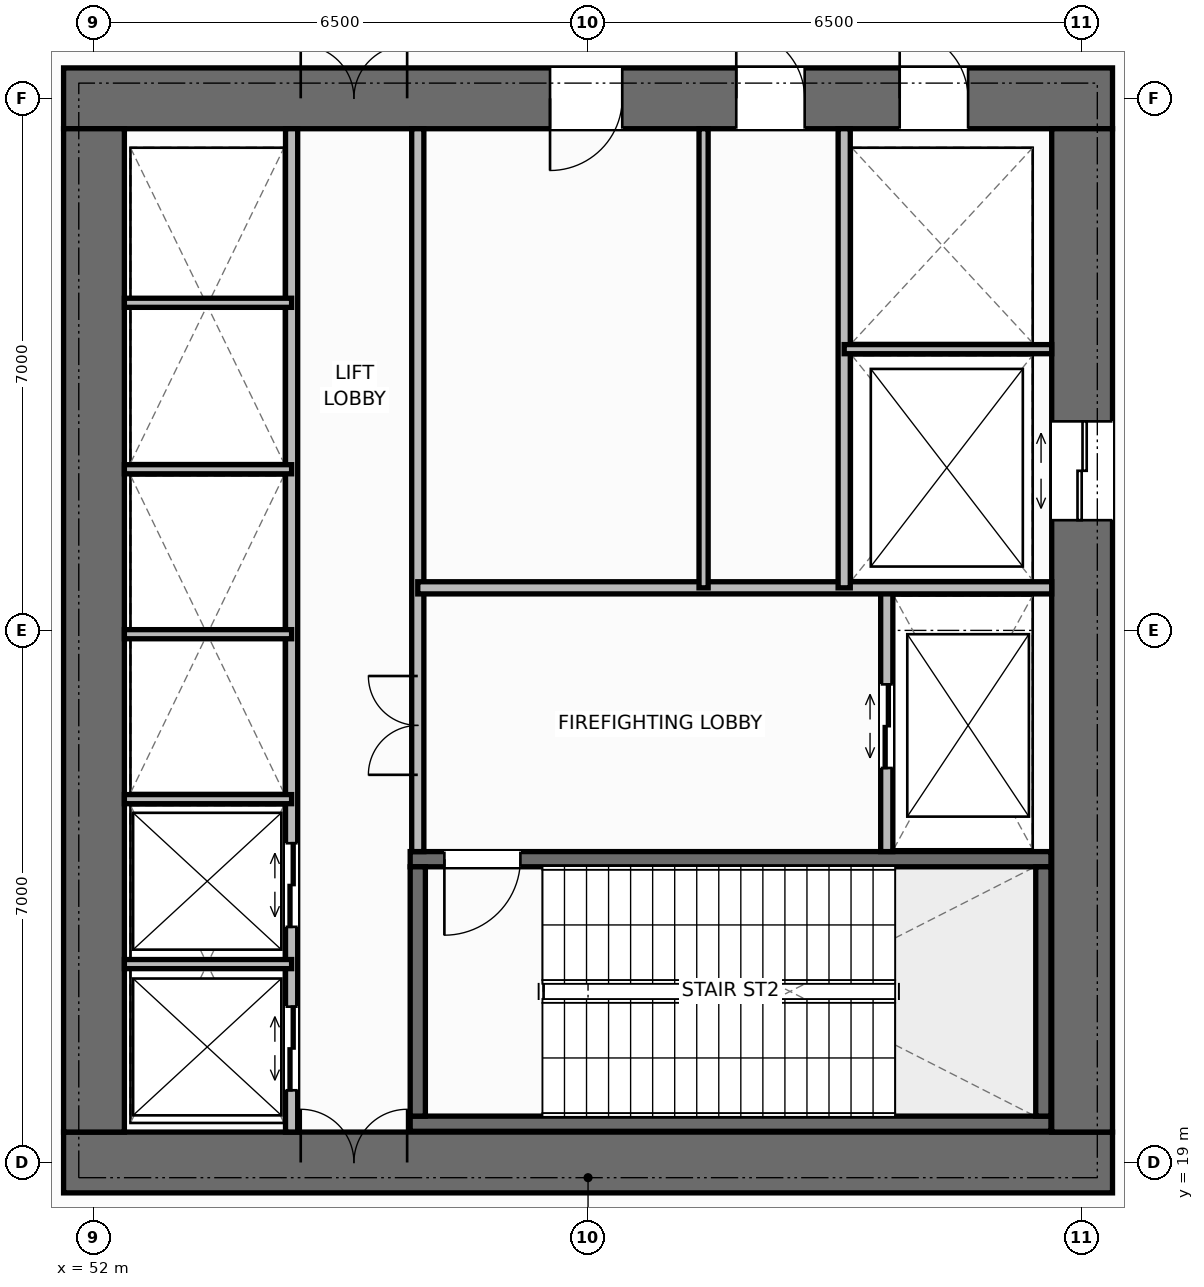
"""IFC4 building model, lengths in metres.
Left out: names, types, materials, properties, quantities, classifications, styles, units other than length and angle.
Written with IfcOpenShell. Run it as: python <this file> out.ifc"""

import sys

from ifc_helpers import new_model, si_unit, direction, frame, frame_2d, origin, place, context, subcontext, project, spatial, rectangle, extrude, element, fill, save


model = new_model("IFC4")
c1 = context("Model", 3, precision=1e-05, world=origin(), true_north=direction((0.0, 1.0)))
c2 = subcontext(c1, "Body", "Model", "MODEL_VIEW")
j1 = project(units=[si_unit("LENGTHUNIT", "METRE"), si_unit("PLANEANGLEUNIT", "RADIAN")], contexts=[c1])
p1 = place(None, origin())
s1 = spatial("IfcSite", under=j1, at=p1, CompositionType="ELEMENT")
p2 = place(p1, origin())
s2 = spatial("IfcBuilding", under=s1, at=p2, CompositionType="ELEMENT")
p3 = place(p2, frame((0.0, 0.0, 22.0)))
s3 = spatial("IfcBuildingStorey", under=s2, at=p3, CompositionType="ELEMENT", Elevation=22.0)
p4 = place(p3, frame((51.6, 19.0, 0.0), z_axis=(0.0, 0.0, 1.0), x_axis=(1.0, 0.0, 0.0)))
e1 = element("IfcWall", 1, at=p4, inside=s3, PredefinedType="SHEAR", context=c2, shape_type="SweptSolid", body=[
    extrude(rectangle(XDim=13.8, YDim=0.8, at=frame_2d((6.9, 0.0))), origin(), (0.0, 0.0, 1.0), 5.8),
])
p5 = place(p4, frame((3.12, 0.0, 0.0)))
e2 = element("IfcOpeningElement", 2, at=p5, cuts=e1, PredefinedType="OPENING", context=c2, shape_type="SweptSolid", body=[
    extrude(rectangle(XDim=1.4, YDim=2.2, at=frame_2d((0.7, 1.1))), frame((0.0, 0.41, 0.0), z_axis=(0.0, -1.0, 0.0), x_axis=(1.0, 0.0, 0.0)), (0.0, 0.0, 1.0), 0.82),
])
p6 = place(p3, frame((51.6, 33.0, 0.0), z_axis=(0.0, 0.0, 1.0), x_axis=(1.0, 0.0, 0.0)))
e3 = element("IfcWall", 3, at=p6, inside=s3, PredefinedType="SHEAR", context=c2, shape_type="SweptSolid", body=[
    extrude(rectangle(XDim=13.8, YDim=0.8, at=frame_2d((6.9, 0.0))), origin(), (0.0, 0.0, 1.0), 5.8),
])
p7 = place(p6, frame((3.12, 0.0, 0.0)))
e4 = element("IfcOpeningElement", 4, at=p7, cuts=e3, PredefinedType="OPENING", context=c2, shape_type="SweptSolid", body=[
    extrude(rectangle(XDim=1.4, YDim=2.2, at=frame_2d((0.7, 1.1))), frame((0.0, 0.41, 0.0), z_axis=(0.0, -1.0, 0.0), x_axis=(1.0, 0.0, 0.0)), (0.0, 0.0, 1.0), 0.82),
])
p8 = place(p6, frame((11.0, 0.0, 0.0)))
e5 = element("IfcOpeningElement", 5, at=p8, cuts=e3, PredefinedType="OPENING", context=c2, shape_type="SweptSolid", body=[
    extrude(rectangle(XDim=0.9, YDim=2.15, at=frame_2d((0.45, 1.075))), frame((0.0, 0.41, 0.0), z_axis=(0.0, -1.0, 0.0), x_axis=(1.0, 0.0, 0.0)), (0.0, 0.0, 1.0), 0.82),
])
p9 = place(p6, frame((6.4, 0.0, 0.0)))
e6 = element("IfcOpeningElement", 6, at=p9, cuts=e3, PredefinedType="OPENING", context=c2, shape_type="SweptSolid", body=[
    extrude(rectangle(XDim=0.95, YDim=2.15, at=frame_2d((0.475, 1.075))), frame((0.0, 0.41, 0.0), z_axis=(0.0, -1.0, 0.0), x_axis=(1.0, 0.0, 0.0)), (0.0, 0.0, 1.0), 0.82),
])
p10 = place(p6, frame((8.85, 0.0, 0.0)))
e7 = element("IfcOpeningElement", 7, at=p10, cuts=e3, PredefinedType="OPENING", context=c2, shape_type="SweptSolid", body=[
    extrude(rectangle(XDim=0.9, YDim=2.15, at=frame_2d((0.45, 1.075))), frame((0.0, 0.41, 0.0), z_axis=(0.0, -1.0, 0.0), x_axis=(1.0, 0.0, 0.0)), (0.0, 0.0, 1.0), 0.82),
])
p11 = place(p3, frame((52.0, 19.4, 0.0), z_axis=(0.0, 0.0, 1.0), x_axis=(0.0, 1.0, 0.0)))
e8 = element("IfcWall", 8, at=p11, inside=s3, PredefinedType="SHEAR", context=c2, shape_type="SweptSolid", body=[
    extrude(rectangle(XDim=13.2, YDim=0.8, at=frame_2d((6.6, 0.0))), origin(), (0.0, 0.0, 1.0), 5.8),
])
p12 = place(p3, frame((65.0, 19.4, 0.0), z_axis=(0.0, 0.0, 1.0), x_axis=(0.0, 1.0, 0.0)))
e9 = element("IfcWall", 9, at=p12, inside=s3, PredefinedType="SHEAR", context=c2, shape_type="SweptSolid", body=[
    extrude(rectangle(XDim=13.2, YDim=0.8, at=frame_2d((6.6, 0.0))), origin(), (0.0, 0.0, 1.0), 5.8),
])
p13 = place(p12, frame((8.05, 0.0, 0.0)))
e10 = element("IfcOpeningElement", 10, at=p13, cuts=e9, PredefinedType="OPENING", context=c2, shape_type="SweptSolid", body=[
    extrude(rectangle(XDim=1.3, YDim=2.2, at=frame_2d((0.65, 1.1))), frame((0.0, 0.41, 0.0), z_axis=(0.0, -1.0, 0.0), x_axis=(1.0, 0.0, 0.0)), (0.0, 0.0, 1.0), 0.82),
])
p14 = place(p3, frame((56.16, 19.51, 0.0), z_axis=(0.0, 0.0, 1.0), x_axis=(1.0, 0.0, 0.0)))
e11 = element("IfcWall", 11, at=p14, inside=s3, PredefinedType="SHEAR", context=c2, shape_type="SweptSolid", body=[
    extrude(rectangle(XDim=8.43, YDim=0.2, at=frame_2d((4.215, 0.0))), origin(), (0.0, 0.0, 1.0), 5.8),
])
p15 = place(p3, frame((56.16, 22.99, 0.0), z_axis=(0.0, 0.0, 1.0), x_axis=(1.0, 0.0, 0.0)))
e12 = element("IfcWall", 12, at=p15, inside=s3, PredefinedType="SHEAR", context=c2, shape_type="SweptSolid", body=[
    extrude(rectangle(XDim=8.43, YDim=0.2, at=frame_2d((4.215, 0.0))), origin(), (0.0, 0.0, 1.0), 5.8),
])
p16 = place(p15, frame((0.45, 0.0, 0.0)))
e13 = element("IfcOpeningElement", 13, at=p16, cuts=e12, PredefinedType="OPENING", context=c2, shape_type="SweptSolid", body=[
    extrude(rectangle(XDim=1.0, YDim=2.15, at=frame_2d((0.5, 1.075))), frame((0.0, 0.11, 0.0), z_axis=(0.0, -1.0, 0.0), x_axis=(1.0, 0.0, 0.0)), (0.0, 0.0, 1.0), 0.22),
])
for number, where, z_axis, x_axis in (
    (14, (56.26, 19.61, 0.0), (0.0, 0.0, 1.0), (0.0, 1.0, 0.0)),
    (15, (64.49, 19.61, 0.0), (0.0, 0.0, 1.0), (0.0, 1.0, 0.0)),
):
    element("IfcWall", number, at=place(p3, frame(where, z_axis=z_axis, x_axis=x_axis)), inside=s3, PredefinedType="SHEAR", context=c2, shape_type="SweptSolid", body=[
        extrude(rectangle(XDim=3.28, YDim=0.2, at=frame_2d((1.64, 0.0))), origin(), (0.0, 0.0, 1.0), 5.8),
    ])
p17 = place(p3, frame((54.6, 19.4, 0.0), z_axis=(0.0, 0.0, 1.0), x_axis=(0.0, 1.0, 0.0)))
e16 = element("IfcWall", 16, at=p17, inside=s3, PredefinedType="STANDARD", context=c2, shape_type="SweptSolid", body=[
    extrude(rectangle(XDim=13.2, YDim=0.16, at=frame_2d((6.6, 0.0))), origin(), (0.0, 0.0, 1.0), 5.55),
])
p18 = place(p17, frame((0.55, 0.0, 0.0)))
e17 = element("IfcOpeningElement", 17, at=p18, cuts=e16, PredefinedType="OPENING", context=c2, shape_type="SweptSolid", body=[
    extrude(rectangle(XDim=1.1, YDim=2.2, at=frame_2d((0.55, 1.1))), frame((0.0, 0.09, 0.0), z_axis=(0.0, -1.0, 0.0), x_axis=(1.0, 0.0, 0.0)), (0.0, 0.0, 1.0), 0.18),
])
p19 = place(p17, frame((2.7, 0.0, 0.0)))
e18 = element("IfcOpeningElement", 18, at=p19, cuts=e16, PredefinedType="OPENING", context=c2, shape_type="SweptSolid", body=[
    extrude(rectangle(XDim=1.1, YDim=2.2, at=frame_2d((0.55, 1.1))), frame((0.0, 0.09, 0.0), z_axis=(0.0, -1.0, 0.0), x_axis=(1.0, 0.0, 0.0)), (0.0, 0.0, 1.0), 0.18),
])
p20 = place(p3, frame((56.26, 23.09, 0.0), z_axis=(0.0, 0.0, 1.0), x_axis=(0.0, 1.0, 0.0)))
e19 = element("IfcWall", 19, at=p20, inside=s3, PredefinedType="STANDARD", context=c2, shape_type="SweptSolid", body=[
    extrude(rectangle(XDim=9.51, YDim=0.16, at=frame_2d((4.755, 0.0))), origin(), (0.0, 0.0, 1.0), 5.55),
])
p21 = place(p20, frame((1.01, 0.0, 0.0)))
e20 = element("IfcOpeningElement", 20, at=p21, cuts=e19, PredefinedType="OPENING", context=c2, shape_type="SweptSolid", body=[
    extrude(rectangle(XDim=1.3, YDim=2.2, at=frame_2d((0.65, 1.1))), frame((0.0, 0.09, 0.0), z_axis=(0.0, -1.0, 0.0), x_axis=(1.0, 0.0, 0.0)), (0.0, 0.0, 1.0), 0.18),
])
for number, where, z_axis, x_axis in (
    (21, (52.4, 21.61, 0.0), (0.0, 0.0, 1.0), (1.0, 0.0, 0.0)),
    (22, (52.4, 23.78, 0.0), (0.0, 0.0, 1.0), (1.0, 0.0, 0.0)),
    (23, (52.4, 25.95, 0.0), (0.0, 0.0, 1.0), (1.0, 0.0, 0.0)),
    (24, (52.4, 28.12, 0.0), (0.0, 0.0, 1.0), (1.0, 0.0, 0.0)),
    (25, (52.4, 30.31, 0.0), (0.0, 0.0, 1.0), (1.0, 0.0, 0.0)),
):
    element("IfcWall", number, at=place(p3, frame(where, z_axis=z_axis, x_axis=x_axis)), inside=s3, PredefinedType="PARTITIONING", context=c2, shape_type="SweptSolid", body=[
        extrude(rectangle(XDim=2.2, YDim=0.12, at=frame_2d((1.1, 0.0))), origin(), (0.0, 0.0, 1.0), 5.55),
    ])
p22 = place(p3, frame((62.43, 23.09, 0.0), z_axis=(0.0, 0.0, 1.0), x_axis=(0.0, 1.0, 0.0)))
e26 = element("IfcWall", 26, at=p22, inside=s3, PredefinedType="STANDARD", context=c2, shape_type="SweptSolid", body=[
    extrude(rectangle(XDim=3.47, YDim=0.16, at=frame_2d((1.735, 0.0))), origin(), (0.0, 0.0, 1.0), 5.55),
])
p23 = place(p22, frame((1.1, 0.0, 0.0)))
e27 = element("IfcOpeningElement", 27, at=p23, cuts=e26, PredefinedType="OPENING", context=c2, shape_type="SweptSolid", body=[
    extrude(rectangle(XDim=1.1, YDim=2.2, at=frame_2d((0.55, 1.1))), frame((0.0, 0.09, 0.0), z_axis=(0.0, -1.0, 0.0), x_axis=(1.0, 0.0, 0.0)), (0.0, 0.0, 1.0), 0.18),
])
p24 = place(p3, frame((56.26, 26.56, 0.0), z_axis=(0.0, 0.0, 1.0), x_axis=(1.0, 0.0, 0.0)))
e28 = element("IfcWall", 28, at=p24, inside=s3, PredefinedType="STANDARD", context=c2, shape_type="SweptSolid", body=[
    extrude(rectangle(XDim=8.34, YDim=0.16, at=frame_2d((4.17, 0.0))), origin(), (0.0, 0.0, 1.0), 5.55),
])
p25 = place(p3, frame((61.87, 26.56, 0.0), z_axis=(0.0, 0.0, 1.0), x_axis=(0.0, 1.0, 0.0)))
e29 = element("IfcWall", 29, at=p25, inside=s3, PredefinedType="STANDARD", context=c2, shape_type="SweptSolid", body=[
    extrude(rectangle(XDim=6.04, YDim=0.16, at=frame_2d((3.02, 0.0))), origin(), (0.0, 0.0, 1.0), 5.55),
])
p26 = place(p3, frame((61.87, 29.7, 0.0), z_axis=(0.0, 0.0, 1.0), x_axis=(1.0, 0.0, 0.0)))
e30 = element("IfcWall", 30, at=p26, inside=s3, PredefinedType="PARTITIONING", context=c2, shape_type="SweptSolid", body=[
    extrude(rectangle(XDim=2.73, YDim=0.12, at=frame_2d((1.365, 0.0))), origin(), (0.0, 0.0, 1.0), 5.55),
])
p27 = place(p3, frame((60.02, 26.56, 0.0), z_axis=(0.0, 0.0, 1.0), x_axis=(0.0, 1.0, 0.0)))
e31 = element("IfcWall", 31, at=p27, inside=s3, PredefinedType="PARTITIONING", context=c2, shape_type="SweptSolid", body=[
    extrude(rectangle(XDim=6.04, YDim=0.12, at=frame_2d((3.02, 0.0))), origin(), (0.0, 0.0, 1.0), 5.55),
])
p28 = place(p5, origin())
e32 = element("IfcDoor", 32, at=p28, inside=s3, OperationType="DOUBLE_DOOR_SINGLE_SWING", PredefinedType="DOOR", context=c2, shape_type="SweptSolid", body=[
    extrude(rectangle(XDim=1.4, YDim=2.2, at=frame_2d((0.7, 1.1))), frame((0.0, 0.125, 0.0), z_axis=(0.0, -1.0, 0.0), x_axis=(1.0, 0.0, 0.0)), (0.0, 0.0, 1.0), 0.05),
])
fill(e2, e32)
p29 = place(p7, origin())
e33 = element("IfcDoor", 33, at=p29, inside=s3, OperationType="DOUBLE_DOOR_SINGLE_SWING", PredefinedType="DOOR", context=c2, shape_type="SweptSolid", body=[
    extrude(rectangle(XDim=1.4, YDim=2.2, at=frame_2d((0.7, 1.1))), frame((0.0, -0.075, 0.0), z_axis=(0.0, -1.0, 0.0), x_axis=(1.0, 0.0, 0.0)), (0.0, 0.0, 1.0), 0.05),
])
fill(e4, e33)
p30 = place(p18, origin())
e34 = element("IfcDoor", 34, at=p30, inside=s3, OperationType="DOUBLE_DOOR_SLIDING", PredefinedType="DOOR", context=c2, shape_type="SweptSolid", body=[
    extrude(rectangle(XDim=1.1, YDim=2.2, at=frame_2d((0.55, 1.1))), frame((0.0, 0.025, 0.0), z_axis=(0.0, -1.0, 0.0), x_axis=(1.0, 0.0, 0.0)), (0.0, 0.0, 1.0), 0.05),
])
fill(e17, e34)
p31 = place(p19, origin())
e35 = element("IfcDoor", 35, at=p31, inside=s3, OperationType="DOUBLE_DOOR_SLIDING", PredefinedType="DOOR", context=c2, shape_type="SweptSolid", body=[
    extrude(rectangle(XDim=1.1, YDim=2.2, at=frame_2d((0.55, 1.1))), frame((0.0, 0.025, 0.0), z_axis=(0.0, -1.0, 0.0), x_axis=(1.0, 0.0, 0.0)), (0.0, 0.0, 1.0), 0.05),
])
fill(e18, e35)
p32 = place(p16, origin())
e36 = element("IfcDoor", 36, at=p32, inside=s3, OperationType="SINGLE_SWING_RIGHT", PredefinedType="DOOR", context=c2, shape_type="SweptSolid", body=[
    extrude(rectangle(XDim=1.0, YDim=2.15, at=frame_2d((0.5, 1.075))), frame((0.0, 0.025, 0.0), z_axis=(0.0, -1.0, 0.0), x_axis=(1.0, 0.0, 0.0)), (0.0, 0.0, 1.0), 0.05),
])
fill(e13, e36)
p33 = place(p23, origin())
e37 = element("IfcDoor", 37, at=p33, inside=s3, OperationType="DOUBLE_DOOR_SLIDING", PredefinedType="DOOR", context=c2, shape_type="SweptSolid", body=[
    extrude(rectangle(XDim=1.1, YDim=2.2, at=frame_2d((0.55, 1.1))), frame((0.0, 0.025, 0.0), z_axis=(0.0, -1.0, 0.0), x_axis=(1.0, 0.0, 0.0)), (0.0, 0.0, 1.0), 0.05),
])
fill(e27, e37)
p34 = place(p21, origin())
e38 = element("IfcDoor", 38, at=p34, inside=s3, OperationType="DOUBLE_DOOR_SINGLE_SWING", PredefinedType="DOOR", context=c2, shape_type="SweptSolid", body=[
    extrude(rectangle(XDim=1.3, YDim=2.2, at=frame_2d((0.65, 1.1))), frame((0.0, 0.025, 0.0), z_axis=(0.0, -1.0, 0.0), x_axis=(1.0, 0.0, 0.0)), (0.0, 0.0, 1.0), 0.05),
])
fill(e20, e38)
p35 = place(p13, origin())
e39 = element("IfcDoor", 39, at=p35, inside=s3, OperationType="DOUBLE_DOOR_SLIDING", PredefinedType="DOOR", context=c2, shape_type="SweptSolid", body=[
    extrude(rectangle(XDim=1.3, YDim=2.2, at=frame_2d((0.65, 1.1))), frame((0.0, 0.025, 0.0), z_axis=(0.0, -1.0, 0.0), x_axis=(1.0, 0.0, 0.0)), (0.0, 0.0, 1.0), 0.05),
])
fill(e10, e39)
p36 = place(p8, origin())
e40 = element("IfcDoor", 40, at=p36, inside=s3, OperationType="SINGLE_SWING_LEFT", PredefinedType="DOOR", context=c2, shape_type="SweptSolid", body=[
    extrude(rectangle(XDim=0.9, YDim=2.15, at=frame_2d((0.45, 1.075))), frame((0.0, -0.075, 0.0), z_axis=(0.0, -1.0, 0.0), x_axis=(1.0, 0.0, 0.0)), (0.0, 0.0, 1.0), 0.05),
])
fill(e5, e40)
p37 = place(p9, origin())
e41 = element("IfcDoor", 41, at=p37, inside=s3, OperationType="SINGLE_SWING_RIGHT", PredefinedType="DOOR", context=c2, shape_type="SweptSolid", body=[
    extrude(rectangle(XDim=0.95, YDim=2.15, at=frame_2d((0.475, 1.075))), frame((0.0, -0.075, 0.0), z_axis=(0.0, -1.0, 0.0), x_axis=(1.0, 0.0, 0.0)), (0.0, 0.0, 1.0), 0.05),
])
fill(e6, e41)
p38 = place(p10, origin())
e42 = element("IfcDoor", 42, at=p38, inside=s3, OperationType="SINGLE_SWING_LEFT", PredefinedType="DOOR", context=c2, shape_type="SweptSolid", body=[
    extrude(rectangle(XDim=0.9, YDim=2.15, at=frame_2d((0.45, 1.075))), frame((0.0, -0.075, 0.0), z_axis=(0.0, -1.0, 0.0), x_axis=(1.0, 0.0, 0.0)), (0.0, 0.0, 1.0), 0.05),
])
fill(e7, e42)
save(model, sys.argv[1])
